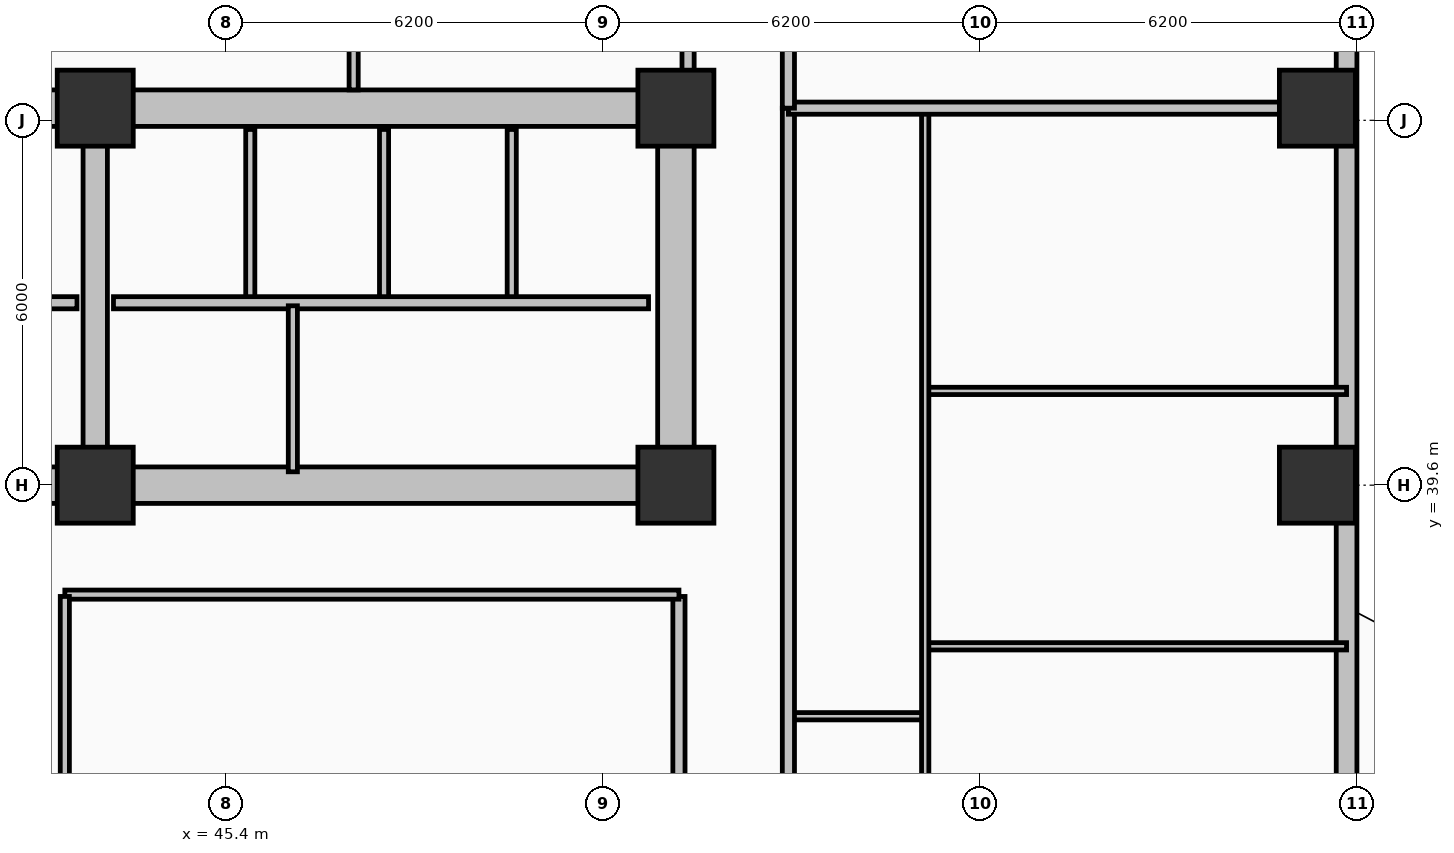
"""IFC4 building model, lengths in metres.
Left out: names, types, materials, properties, quantities, classifications, styles, units other than length and angle.
Written with IfcOpenShell. Run it as: python <this file> out.ifc"""

import sys

from ifc_helpers import new_model, si_unit, direction, frame, frame_2d, origin, origin_2d, place, context, subcontext, project, spatial, rectangle, extrude, element, fill, save


model = new_model("IFC4")
c1 = context("Model", 3, precision=1e-05, world=origin(), true_north=direction((0.0, 1.0)))
c2 = subcontext(c1, "Body", "Model", "MODEL_VIEW")
j1 = project(units=[si_unit("LENGTHUNIT", "METRE"), si_unit("PLANEANGLEUNIT", "RADIAN")], contexts=[c1])
p1 = place(None, origin())
s1 = spatial("IfcSite", under=j1, at=p1, CompositionType="ELEMENT")
p2 = place(p1, origin())
s2 = spatial("IfcBuilding", under=s1, at=p2, CompositionType="ELEMENT")
p3 = place(p2, frame((0.0, 0.0, 36.2)))
s3 = spatial("IfcBuildingStorey", under=s2, at=p3, CompositionType="ELEMENT", Elevation=36.2)
p4 = place(p3, frame((25.6, 45.8, 0.0), z_axis=(0.0, 0.0, 1.0), x_axis=(1.0, 0.0, 0.0)))
e1 = element("IfcWall", 1, at=p4, inside=s3, PredefinedType="SHEAR", context=c2, shape_type="SweptSolid", body=[
    extrude(rectangle(XDim=27.2, YDim=0.6, at=frame_2d((13.6, 0.0))), origin(), (0.0, 0.0, 1.0), 3.7),
])
p5 = place(p3, frame((52.8, 39.9, 0.0), z_axis=(0.0, 0.0, 1.0), x_axis=(0.0, 1.0, 0.0)))
e2 = element("IfcWall", 2, at=p5, inside=s3, PredefinedType="SHEAR", context=c2, shape_type="SweptSolid", body=[
    extrude(rectangle(XDim=5.6, YDim=0.6, at=frame_2d((2.8, 0.0))), origin(), (0.0, 0.0, 1.0), 3.7),
])
p6 = place(p3, frame((52.8, 39.6, 0.0), z_axis=(0.0, 0.0, 1.0), x_axis=(-1.0, 0.0, 0.0)))
e3 = element("IfcWall", 3, at=p6, inside=s3, PredefinedType="SHEAR", context=c2, shape_type="SweptSolid", body=[
    extrude(rectangle(XDim=27.2, YDim=0.6, at=frame_2d((13.6, 0.0))), origin(), (0.0, 0.0, 1.0), 3.7),
])
p7 = place(p6, frame((24.3, 0.0, 0.0)))
e4 = element("IfcOpeningElement", 4, at=p7, cuts=e3, PredefinedType="OPENING", context=c2, shape_type="SweptSolid", body=[
    extrude(rectangle(XDim=1.1, YDim=2.15, at=frame_2d((0.55, 1.075))), frame((0.0, 0.31, 0.0), z_axis=(0.0, -1.0, 0.0), x_axis=(1.0, 0.0, 0.0)), (0.0, 0.0, 1.0), 0.62),
])
p8 = place(p6, frame((21.85, 0.0, 0.0)))
e5 = element("IfcOpeningElement", 5, at=p8, cuts=e3, PredefinedType="OPENING", context=c2, shape_type="SweptSolid", body=[
    extrude(rectangle(XDim=0.85, YDim=2.1, at=frame_2d((0.425, 1.05))), frame((0.0, 0.31, 0.0), z_axis=(0.0, -1.0, 0.0), x_axis=(1.0, 0.0, 0.0)), (0.0, 0.0, 1.0), 0.62),
])
p9 = place(p6, frame((19.85, 0.0, 0.0)))
e6 = element("IfcOpeningElement", 6, at=p9, cuts=e3, PredefinedType="OPENING", context=c2, shape_type="SweptSolid", body=[
    extrude(rectangle(XDim=0.85, YDim=2.1, at=frame_2d((0.425, 1.05))), frame((0.0, 0.31, 0.0), z_axis=(0.0, -1.0, 0.0), x_axis=(1.0, 0.0, 0.0)), (0.0, 0.0, 1.0), 0.62),
])
p10 = place(p6, frame((15.1, 0.0, 0.0)))
e7 = element("IfcOpeningElement", 7, at=p10, cuts=e3, PredefinedType="OPENING", context=c2, shape_type="SweptSolid", body=[
    extrude(rectangle(XDim=1.2, YDim=2.15, at=frame_2d((0.6, 1.075))), frame((0.0, 0.31, 0.0), z_axis=(0.0, -1.0, 0.0), x_axis=(1.0, 0.0, 0.0)), (0.0, 0.0, 1.0), 0.62),
])
p11 = place(p6, frame((12.6, 0.0, 0.0)))
e8 = element("IfcOpeningElement", 8, at=p11, cuts=e3, PredefinedType="OPENING", context=c2, shape_type="SweptSolid", body=[
    extrude(rectangle(XDim=0.85, YDim=2.1, at=frame_2d((0.425, 1.05))), frame((0.0, 0.31, 0.0), z_axis=(0.0, -1.0, 0.0), x_axis=(1.0, 0.0, 0.0)), (0.0, 0.0, 1.0), 0.62),
])
p12 = place(p6, frame((10.85, 0.0, 0.0)))
e9 = element("IfcOpeningElement", 9, at=p12, cuts=e3, PredefinedType="OPENING", context=c2, shape_type="SweptSolid", body=[
    extrude(rectangle(XDim=0.85, YDim=2.1, at=frame_2d((0.425, 1.05))), frame((0.0, 0.31, 0.0), z_axis=(0.0, -1.0, 0.0), x_axis=(1.0, 0.0, 0.0)), (0.0, 0.0, 1.0), 0.62),
])
p13 = place(p6, frame((6.85, 0.0, 0.0)))
e10 = element("IfcOpeningElement", 10, at=p13, cuts=e3, PredefinedType="OPENING", context=c2, shape_type="SweptSolid", body=[
    extrude(rectangle(XDim=0.85, YDim=2.1, at=frame_2d((0.425, 1.05))), frame((0.0, 0.31, 0.0), z_axis=(0.0, -1.0, 0.0), x_axis=(1.0, 0.0, 0.0)), (0.0, 0.0, 1.0), 0.62),
])
p14 = place(p6, frame((2.0, 0.0, 0.0)))
e11 = element("IfcOpeningElement", 11, at=p14, cuts=e3, PredefinedType="OPENING", context=c2, shape_type="SweptSolid", body=[
    extrude(rectangle(XDim=0.85, YDim=2.1, at=frame_2d((0.425, 1.05))), frame((0.0, 0.31, 0.0), z_axis=(0.0, -1.0, 0.0), x_axis=(1.0, 0.0, 0.0)), (0.0, 0.0, 1.0), 0.62),
])
p15 = place(p3, frame((43.25, 39.9, 0.0), z_axis=(0.0, 0.0, 1.0), x_axis=(0.0, 1.0, 0.0)))
e12 = element("IfcWall", 12, at=p15, inside=s3, PredefinedType="SHEAR", context=c2, shape_type="SweptSolid", body=[
    extrude(rectangle(XDim=5.6, YDim=0.4, at=frame_2d((2.8, 0.0))), origin(), (0.0, 0.0, 1.0), 3.7),
])
for number, where, z_axis, x_axis in (
    (13, (43.25, 39.6, 0.0), (0.0, 0.0, 1.0), (1.0, 0.0, 0.0)),
    (14, (43.25, 45.8, 0.0), (0.0, 0.0, 1.0), (1.0, 0.0, 0.0)),
    (15, (52.8, 39.6, 0.0), (0.0, 0.0, 1.0), (1.0, 0.0, 0.0)),
    (16, (52.8, 45.8, 0.0), (0.0, 0.0, 1.0), (1.0, 0.0, 0.0)),
    (17, (63.35, 39.6, 0.0), (0.0, 0.0, 1.0), (1.0, 0.0, 0.0)),
    (18, (63.35, 45.8, 0.0), (0.0, 0.0, 1.0), (1.0, 0.0, 0.0)),
):
    element("IfcColumn", number, at=place(p3, frame(where, z_axis=z_axis, x_axis=x_axis)), inside=s3, PredefinedType="COLUMN", context=c2, shape_type="SweptSolid", body=[
        extrude(rectangle(XDim=1.25, YDim=1.25, at=origin_2d()), origin(), (0.0, 0.0, 1.0), 3.7),
    ])
p16 = place(p3, frame((63.83, 32.6, 0.0), z_axis=(0.0, 0.0, 1.0), x_axis=(0.0, 1.0, 0.0)))
e19 = element("IfcWall", 19, at=p16, inside=s3, PredefinedType="SOLIDWALL", context=c2, shape_type="SweptSolid", body=[
    extrude(rectangle(XDim=14.8, YDim=0.34, at=frame_2d((7.4, 0.0))), origin(), (0.0, 0.0, 1.0), 2.7),
])
p17 = place(p16, frame((1.7, 0.0, 0.0)))
e20 = element("IfcOpeningElement", 20, at=p17, cuts=e19, PredefinedType="OPENING", context=c2, shape_type="SweptSolid", body=[
    extrude(rectangle(XDim=1.6, YDim=2.1, at=frame_2d((0.8, 1.05))), frame((0.0, 0.18, 0.0), z_axis=(0.0, -1.0, 0.0), x_axis=(1.0, 0.0, 0.0)), (0.0, 0.0, 1.0), 0.36),
])
p18 = place(p16, frame((4.92, 0.0, 0.69)))
e21 = element("IfcOpeningElement", 21, at=p18, cuts=e19, PredefinedType="OPENING", context=c2, shape_type="SweptSolid", body=[
    extrude(rectangle(XDim=1.4, YDim=1.85, at=frame_2d((0.7, 0.925))), frame((0.0, 0.18, 0.0), z_axis=(0.0, -1.0, 0.0), x_axis=(1.0, 0.0, 0.0)), (0.0, 0.0, 1.0), 0.36),
])
p19 = place(p16, frame((9.95, 0.0, 0.73)))
e22 = element("IfcOpeningElement", 22, at=p19, cuts=e19, PredefinedType="OPENING", context=c2, shape_type="SweptSolid", body=[
    extrude(rectangle(XDim=1.8, YDim=1.85, at=frame_2d((0.9, 0.925))), frame((0.0, 0.18, 0.0), z_axis=(0.0, -1.0, 0.0), x_axis=(1.0, 0.0, 0.0)), (0.0, 0.0, 1.0), 0.36),
])
p20 = place(p3, frame((42.95, 42.6, 0.0), z_axis=(0.0, 0.0, 1.0), x_axis=(-1.0, 0.0, 0.0)))
e23 = element("IfcWall", 23, at=p20, inside=s3, PredefinedType="PARTITIONING", context=c2, shape_type="SweptSolid", body=[
    extrude(rectangle(XDim=4.6, YDim=0.2, at=frame_2d((2.3, 0.0))), origin(), (0.0, 0.0, 1.0), 2.3),
])
for number, where, z_axis, x_axis in (
    (24, (45.8, 42.65, 0.0), (0.0, 0.0, 1.0), (0.0, 1.0, 0.0)),
    (25, (48.0, 42.65, 0.0), (0.0, 0.0, 1.0), (0.0, 1.0, 0.0)),
    (26, (50.1, 42.65, 0.0), (0.0, 0.0, 1.0), (0.0, 1.0, 0.0)),
):
    element("IfcWall", number, at=place(p3, frame(where, z_axis=z_axis, x_axis=x_axis)), inside=s3, PredefinedType="PARTITIONING", context=c2, shape_type="SweptSolid", body=[
        extrude(rectangle(XDim=2.8, YDim=0.15, at=frame_2d((1.4, 0.0))), origin(), (0.0, 0.0, 1.0), 2.53),
    ])
p21 = place(p3, frame((52.35, 42.6, 0.0), z_axis=(0.0, 0.0, 1.0), x_axis=(-1.0, 0.0, 0.0)))
e27 = element("IfcWall", 27, at=p21, inside=s3, PredefinedType="PARTITIONING", context=c2, shape_type="SweptSolid", body=[
    extrude(rectangle(XDim=8.8, YDim=0.2, at=frame_2d((4.4, 0.0))), origin(), (0.0, 0.0, 1.0), 2.53),
])
p22 = place(p3, frame((46.5, 39.82, 0.0), z_axis=(0.0, 0.0, 1.0), x_axis=(0.0, 1.0, 0.0)))
e28 = element("IfcWall", 28, at=p22, inside=s3, PredefinedType="PARTITIONING", context=c2, shape_type="SweptSolid", body=[
    extrude(rectangle(XDim=2.73, YDim=0.15, at=frame_2d((1.365, 0.0))), origin(), (0.0, 0.0, 1.0), 2.53),
])
p23 = place(p3, frame((52.85, 18.63, 0.0), z_axis=(0.0, 0.0, 1.0), x_axis=(0.0, 1.0, 0.0)))
e29 = element("IfcWall", 29, at=p23, inside=s3, PredefinedType="PARTITIONING", context=c2, shape_type="SweptSolid", body=[
    extrude(rectangle(XDim=19.14, YDim=0.2, at=frame_2d((9.57, 0.0))), origin(), (0.0, 0.0, 1.0), 2.53),
])
p24 = place(p3, frame((42.75, 37.8, 0.0), z_axis=(0.0, 0.0, 1.0), x_axis=(1.0, 0.0, 0.0)))
e30 = element("IfcWall", 30, at=p24, inside=s3, PredefinedType="PARTITIONING", context=c2, shape_type="SweptSolid", body=[
    extrude(rectangle(XDim=10.1, YDim=0.15, at=frame_2d((5.05, 0.0))), origin(), (0.0, 0.0, 1.0), 2.53),
])
p25 = place(p3, frame((42.75, 18.63, 0.0), z_axis=(0.0, 0.0, 1.0), x_axis=(0.0, 1.0, 0.0)))
e31 = element("IfcWall", 31, at=p25, inside=s3, PredefinedType="PARTITIONING", context=c2, shape_type="SweptSolid", body=[
    extrude(rectangle(XDim=19.14, YDim=0.15, at=frame_2d((9.57, 0.0))), origin(), (0.0, 0.0, 1.0), 2.53),
])
p26 = place(p25, frame((5.5, 0.0, 0.0)))
e32 = element("IfcOpeningElement", 32, at=p26, cuts=e31, PredefinedType="OPENING", context=c2, shape_type="SweptSolid", body=[
    extrude(rectangle(XDim=1.0, YDim=2.15, at=frame_2d((0.5, 1.075))), frame((0.0, 0.085, 0.0), z_axis=(0.0, -1.0, 0.0), x_axis=(1.0, 0.0, 0.0)), (0.0, 0.0, 1.0), 0.17),
])
p27 = place(p3, frame((54.65, 35.8, 0.0), z_axis=(0.0, 0.0, 1.0), x_axis=(1.0, 0.0, 0.0)))
e33 = element("IfcWall", 33, at=p27, inside=s3, PredefinedType="PARTITIONING", context=c2, shape_type="SweptSolid", body=[
    extrude(rectangle(XDim=2.25, YDim=0.12, at=frame_2d((1.125, 0.0))), origin(), (0.0, 0.0, 1.0), 2.53),
])
p28 = place(p3, frame((56.9, 36.95, 0.0), z_axis=(0.0, 0.0, 1.0), x_axis=(1.0, 0.0, 0.0)))
e34 = element("IfcWall", 34, at=p28, inside=s3, PredefinedType="PARTITIONING", context=c2, shape_type="SweptSolid", body=[
    extrude(rectangle(XDim=6.93, YDim=0.12, at=frame_2d((3.465, 0.0))), origin(), (0.0, 0.0, 1.0), 2.53),
])
p29 = place(p28, frame((0.45, 0.0, 0.0)))
e35 = element("IfcOpeningElement", 35, at=p29, cuts=e34, PredefinedType="OPENING", context=c2, shape_type="SweptSolid", body=[
    extrude(rectangle(XDim=0.9, YDim=2.1, at=frame_2d((0.45, 1.05))), frame((0.0, 0.07, 0.0), z_axis=(0.0, -1.0, 0.0), x_axis=(1.0, 0.0, 0.0)), (0.0, 0.0, 1.0), 0.14),
])
p30 = place(p3, frame((56.9, 41.15, 0.0), z_axis=(0.0, 0.0, 1.0), x_axis=(1.0, 0.0, 0.0)))
e36 = element("IfcWall", 36, at=p30, inside=s3, PredefinedType="PARTITIONING", context=c2, shape_type="SweptSolid", body=[
    extrude(rectangle(XDim=6.93, YDim=0.12, at=frame_2d((3.465, 0.0))), origin(), (0.0, 0.0, 1.0), 2.53),
])
p31 = place(p30, frame((0.45, 0.0, 0.0)))
e37 = element("IfcOpeningElement", 37, at=p31, cuts=e36, PredefinedType="OPENING", context=c2, shape_type="SweptSolid", body=[
    extrude(rectangle(XDim=0.9, YDim=2.1, at=frame_2d((0.45, 1.05))), frame((0.0, 0.07, 0.0), z_axis=(0.0, -1.0, 0.0), x_axis=(1.0, 0.0, 0.0)), (0.0, 0.0, 1.0), 0.14),
])
p32 = place(p3, frame((56.9, 26.64, 0.0), z_axis=(0.0, 0.0, 1.0), x_axis=(0.0, 1.0, 0.0)))
e38 = element("IfcWall", 38, at=p32, inside=s3, PredefinedType="PARTITIONING", context=c2, shape_type="SweptSolid", body=[
    extrude(rectangle(XDim=19.12, YDim=0.12, at=frame_2d((9.56, 0.0))), origin(), (0.0, 0.0, 1.0), 2.53),
])
p33 = place(p32, frame((2.81, 0.0, 0.0)))
e39 = element("IfcOpeningElement", 39, at=p33, cuts=e38, PredefinedType="OPENING", context=c2, shape_type="SweptSolid", body=[
    extrude(rectangle(XDim=0.9, YDim=2.1, at=frame_2d((0.45, 1.05))), frame((0.0, 0.07, 0.0), z_axis=(0.0, -1.0, 0.0), x_axis=(1.0, 0.0, 0.0)), (0.0, 0.0, 1.0), 0.14),
])
p34 = place(p32, frame((16.18, 0.0, 0.0)))
e40 = element("IfcOpeningElement", 40, at=p34, cuts=e38, PredefinedType="OPENING", context=c2, shape_type="SweptSolid", body=[
    extrude(rectangle(XDim=0.82, YDim=2.08, at=frame_2d((0.41, 1.04))), frame((0.0, 0.07, 0.0), z_axis=(0.0, -1.0, 0.0), x_axis=(1.0, 0.0, 0.0)), (0.0, 0.0, 1.0), 0.14),
])
p35 = place(p3, frame((54.65, 10.6, 0.0), z_axis=(0.0, 0.0, 1.0), x_axis=(0.0, 1.0, 0.0)))
e41 = element("IfcWall", 41, at=p35, inside=s3, PredefinedType="PARTITIONING", context=c2, shape_type="SweptSolid", body=[
    extrude(rectangle(XDim=35.2, YDim=0.2, at=frame_2d((17.6, 0.0))), origin(), (0.0, 0.0, 1.0), 2.53),
])
p36 = place(p35, frame((2.65, 0.0, 0.0)))
e42 = element("IfcOpeningElement", 42, at=p36, cuts=e41, PredefinedType="OPENING", context=c2, shape_type="SweptSolid", body=[
    extrude(rectangle(XDim=1.0, YDim=2.15, at=frame_2d((0.5, 1.075))), frame((0.0, 0.11, 0.0), z_axis=(0.0, -1.0, 0.0), x_axis=(1.0, 0.0, 0.0)), (0.0, 0.0, 1.0), 0.22),
])
p37 = place(p35, frame((19.95, 0.0, 0.0)))
e43 = element("IfcOpeningElement", 43, at=p37, cuts=e41, PredefinedType="OPENING", context=c2, shape_type="SweptSolid", body=[
    extrude(rectangle(XDim=1.0, YDim=2.15, at=frame_2d((0.5, 1.075))), frame((0.0, 0.11, 0.0), z_axis=(0.0, -1.0, 0.0), x_axis=(1.0, 0.0, 0.0)), (0.0, 0.0, 1.0), 0.22),
])
p38 = place(p3, frame((54.65, 45.8, 0.0), z_axis=(0.0, 0.0, 1.0), x_axis=(1.0, 0.0, 0.0)))
e44 = element("IfcWall", 44, at=p38, inside=s3, PredefinedType="PARTITIONING", context=c2, shape_type="SweptSolid", body=[
    extrude(rectangle(XDim=8.76, YDim=0.2, at=frame_2d((4.38, 0.0))), origin(), (0.0, 0.0, 1.0), 2.53),
])
p39 = place(p3, frame((54.65, 45.8, 0.0), z_axis=(0.0, 0.0, 1.0), x_axis=(0.0, 1.0, 0.0)))
e45 = element("IfcWall", 45, at=p39, inside=s3, PredefinedType="PARTITIONING", context=c2, shape_type="SweptSolid", body=[
    extrude(rectangle(XDim=5.63, YDim=0.2, at=frame_2d((2.815, 0.0))), origin(), (0.0, 0.0, 1.0), 2.53),
])
p40 = place(p3, frame((47.5, 46.1, 0.0), z_axis=(0.0, 0.0, 1.0), x_axis=(0.0, 1.0, 0.0)))
e46 = element("IfcWall", 46, at=p40, inside=s3, PredefinedType="PARTITIONING", context=c2, shape_type="SweptSolid", body=[
    extrude(rectangle(XDim=5.33, YDim=0.15, at=frame_2d((2.665, 0.0))), origin(), (0.0, 0.0, 1.0), 2.53),
])
p41 = place(p40, frame((0.85, 0.0, 0.0)))
e47 = element("IfcOpeningElement", 47, at=p41, cuts=e46, PredefinedType="OPENING", context=c2, shape_type="SweptSolid", body=[
    extrude(rectangle(XDim=0.9, YDim=2.1, at=frame_2d((0.45, 1.05))), frame((0.0, 0.085, 0.0), z_axis=(0.0, -1.0, 0.0), x_axis=(1.0, 0.0, 0.0)), (0.0, 0.0, 1.0), 0.17),
])
p42 = place(p3, frame((53.0, 46.1, 0.0), z_axis=(0.0, 0.0, 1.0), x_axis=(0.0, 1.0, 0.0)))
e48 = element("IfcWall", 48, at=p42, inside=s3, PredefinedType="PARTITIONING", context=c2, shape_type="SweptSolid", body=[
    extrude(rectangle(XDim=4.38, YDim=0.2, at=frame_2d((2.19, 0.0))), origin(), (0.0, 0.0, 1.0), 2.53),
])
p43 = place(p42, frame((1.05, 0.0, 0.0)))
e49 = element("IfcOpeningElement", 49, at=p43, cuts=e48, PredefinedType="OPENING", context=c2, shape_type="SweptSolid", body=[
    extrude(rectangle(XDim=0.9, YDim=2.1, at=frame_2d((0.45, 1.05))), frame((0.0, 0.11, 0.0), z_axis=(0.0, -1.0, 0.0), x_axis=(1.0, 0.0, 0.0)), (0.0, 0.0, 1.0), 0.22),
])
p44 = place(p17, origin())
e50 = element("IfcDoor", 50, at=p44, inside=s3, OperationType="DOUBLE_DOOR_SINGLE_SWING", PredefinedType="DOOR", context=c2, shape_type="SweptSolid", body=[
    extrude(rectangle(XDim=1.6, YDim=2.1, at=frame_2d((0.8, 1.05))), frame((0.0, 0.025, 0.0), z_axis=(0.0, -1.0, 0.0), x_axis=(1.0, 0.0, 0.0)), (0.0, 0.0, 1.0), 0.05),
])
fill(e20, e50)
p45 = place(p18, origin())
e51 = element("IfcWindow", 51, at=p45, inside=s3, PartitioningType="SINGLE_PANEL", PredefinedType="WINDOW", context=c2, shape_type="SweptSolid", body=[
    extrude(rectangle(XDim=1.4, YDim=1.85, at=frame_2d((0.7, 0.925))), frame((0.0, 0.03, 0.0), z_axis=(0.0, -1.0, 0.0), x_axis=(1.0, 0.0, 0.0)), (0.0, 0.0, 1.0), 0.06),
])
fill(e21, e51)
p46 = place(p19, origin())
e52 = element("IfcWindow", 52, at=p46, inside=s3, PartitioningType="SINGLE_PANEL", PredefinedType="WINDOW", context=c2, shape_type="SweptSolid", body=[
    extrude(rectangle(XDim=1.8, YDim=1.85, at=frame_2d((0.9, 0.925))), frame((0.0, 0.03, 0.0), z_axis=(0.0, -1.0, 0.0), x_axis=(1.0, 0.0, 0.0)), (0.0, 0.0, 1.0), 0.06),
])
fill(e22, e52)
p47 = place(p29, origin())
e53 = element("IfcDoor", 53, at=p47, inside=s3, OperationType="SINGLE_SWING_RIGHT", PredefinedType="DOOR", context=c2, shape_type="SweptSolid", body=[
    extrude(rectangle(XDim=0.9, YDim=2.1, at=frame_2d((0.45, 1.05))), frame((0.0, 0.025, 0.0), z_axis=(0.0, -1.0, 0.0), x_axis=(1.0, 0.0, 0.0)), (0.0, 0.0, 1.0), 0.05),
])
fill(e35, e53)
p48 = place(p31, origin())
e54 = element("IfcDoor", 54, at=p48, inside=s3, OperationType="SINGLE_SWING_LEFT", PredefinedType="DOOR", context=c2, shape_type="SweptSolid", body=[
    extrude(rectangle(XDim=0.9, YDim=2.1, at=frame_2d((0.45, 1.05))), frame((0.0, 0.025, 0.0), z_axis=(0.0, -1.0, 0.0), x_axis=(1.0, 0.0, 0.0)), (0.0, 0.0, 1.0), 0.05),
])
fill(e37, e54)
p49 = place(p34, origin())
e55 = element("IfcDoor", 55, at=p49, inside=s3, OperationType="SINGLE_SWING_LEFT", PredefinedType="DOOR", context=c2, shape_type="SweptSolid", body=[
    extrude(rectangle(XDim=0.82, YDim=2.08, at=frame_2d((0.41, 1.04))), frame((0.0, 0.025, 0.0), z_axis=(0.0, -1.0, 0.0), x_axis=(1.0, 0.0, 0.0)), (0.0, 0.0, 1.0), 0.05),
])
fill(e40, e55)
p50 = place(p13, origin())
e56 = element("IfcDoor", 56, at=p50, inside=s3, OperationType="SINGLE_SWING_LEFT", PredefinedType="DOOR", context=c2, shape_type="SweptSolid", body=[
    extrude(rectangle(XDim=0.85, YDim=2.1, at=frame_2d((0.425, 1.05))), frame((0.0, 0.025, 0.0), z_axis=(0.0, -1.0, 0.0), x_axis=(1.0, 0.0, 0.0)), (0.0, 0.0, 1.0), 0.05),
])
fill(e10, e56)
p51 = place(p14, origin())
e57 = element("IfcDoor", 57, at=p51, inside=s3, OperationType="SINGLE_SWING_RIGHT", PredefinedType="DOOR", context=c2, shape_type="SweptSolid", body=[
    extrude(rectangle(XDim=0.85, YDim=2.1, at=frame_2d((0.425, 1.05))), frame((0.0, 0.025, 0.0), z_axis=(0.0, -1.0, 0.0), x_axis=(1.0, 0.0, 0.0)), (0.0, 0.0, 1.0), 0.05),
])
fill(e11, e57)
save(model, sys.argv[1])
